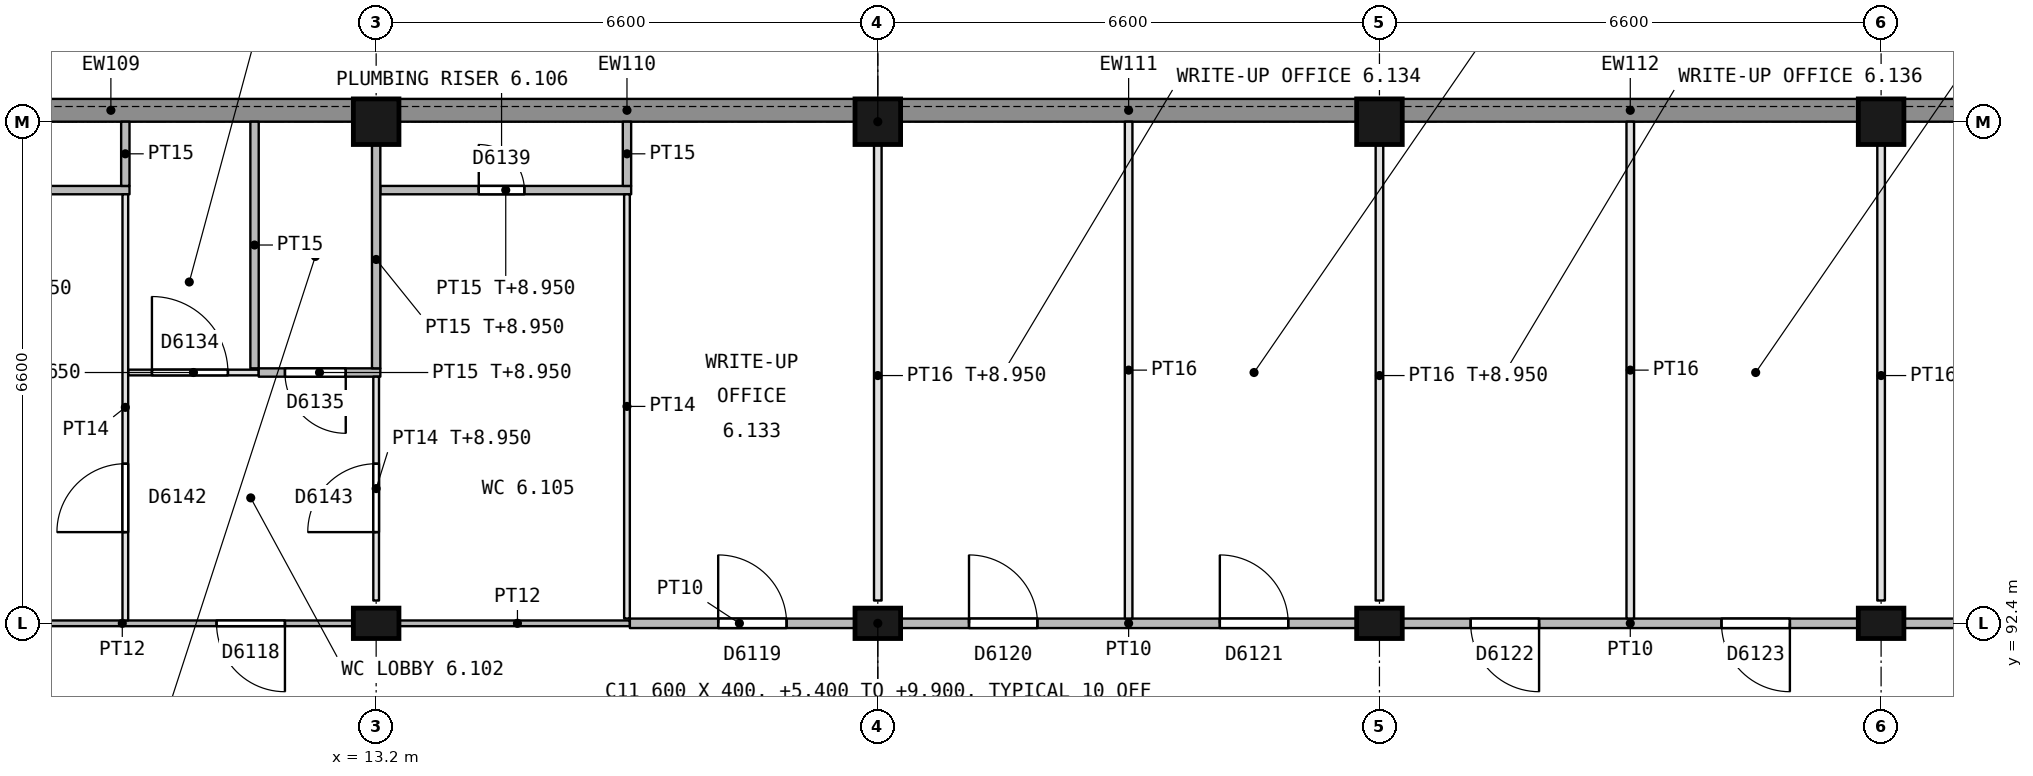
"""IFC4 building model, lengths in metres.
Left out: names, types, materials, properties, quantities, classifications, styles, units other than length and angle.
Written with IfcOpenShell. Run it as: python <this file> out.ifc"""

import sys

from ifc_helpers import new_model, si_unit, direction, frame, frame_2d, origin, origin_2d, place, context, subcontext, project, spatial, rectangle, extrude, element, fill, save


model = new_model("IFC4")
c1 = context("Model", 3, precision=1e-05, world=origin(), true_north=direction((0.0, 1.0)))
c2 = subcontext(c1, "Body", "Model", "MODEL_VIEW")
j1 = project(units=[si_unit("LENGTHUNIT", "METRE"), si_unit("PLANEANGLEUNIT", "RADIAN")], contexts=[c1])
p1 = place(None, origin())
s1 = spatial("IfcSite", under=j1, at=p1, CompositionType="ELEMENT")
p2 = place(p1, origin())
s2 = spatial("IfcBuilding", under=s1, at=p2, CompositionType="ELEMENT")
p3 = place(p2, frame((0.0, 0.0, 5.4)))
s3 = spatial("IfcBuildingStorey", under=s2, at=p3, CompositionType="ELEMENT", Elevation=5.4)
p4 = place(p3, frame((13.2, 92.4, 0.0), z_axis=(0.0, 0.0, 1.0), x_axis=(1.0, 0.0, 0.0)))
e1 = element("IfcColumn", 1, at=p4, inside=s3, PredefinedType="COLUMN", context=c2, shape_type="SweptSolid", body=[
    extrude(rectangle(XDim=0.6, YDim=0.4, at=origin_2d()), origin(), (0.0, 0.0, 1.0), 4.5),
])
p5 = place(p3, frame((13.2, 99.0, 0.0), z_axis=(0.0, 0.0, 1.0), x_axis=(1.0, 0.0, 0.0)))
e2 = element("IfcColumn", 2, at=p5, inside=s3, PredefinedType="COLUMN", context=c2, shape_type="SweptSolid", body=[
    extrude(rectangle(XDim=0.6, YDim=0.6, at=origin_2d()), origin(), (0.0, 0.0, 1.0), 4.5),
])
p6 = place(p3, frame((19.8, 92.4, 0.0), z_axis=(0.0, 0.0, 1.0), x_axis=(1.0, 0.0, 0.0)))
e3 = element("IfcColumn", 3, at=p6, inside=s3, PredefinedType="COLUMN", context=c2, shape_type="SweptSolid", body=[
    extrude(rectangle(XDim=0.6, YDim=0.4, at=origin_2d()), origin(), (0.0, 0.0, 1.0), 4.5),
])
p7 = place(p3, frame((19.8, 99.0, 0.0), z_axis=(0.0, 0.0, 1.0), x_axis=(1.0, 0.0, 0.0)))
e4 = element("IfcColumn", 4, at=p7, inside=s3, PredefinedType="COLUMN", context=c2, shape_type="SweptSolid", body=[
    extrude(rectangle(XDim=0.6, YDim=0.6, at=origin_2d()), origin(), (0.0, 0.0, 1.0), 4.5),
])
p8 = place(p3, frame((26.4, 92.4, 0.0), z_axis=(0.0, 0.0, 1.0), x_axis=(1.0, 0.0, 0.0)))
e5 = element("IfcColumn", 5, at=p8, inside=s3, PredefinedType="COLUMN", context=c2, shape_type="SweptSolid", body=[
    extrude(rectangle(XDim=0.6, YDim=0.4, at=origin_2d()), origin(), (0.0, 0.0, 1.0), 4.5),
])
p9 = place(p3, frame((26.4, 99.0, 0.0), z_axis=(0.0, 0.0, 1.0), x_axis=(1.0, 0.0, 0.0)))
e6 = element("IfcColumn", 6, at=p9, inside=s3, PredefinedType="COLUMN", context=c2, shape_type="SweptSolid", body=[
    extrude(rectangle(XDim=0.6, YDim=0.6, at=origin_2d()), origin(), (0.0, 0.0, 1.0), 4.5),
])
p10 = place(p3, frame((33.0, 92.4, 0.0), z_axis=(0.0, 0.0, 1.0), x_axis=(1.0, 0.0, 0.0)))
e7 = element("IfcColumn", 7, at=p10, inside=s3, PredefinedType="COLUMN", context=c2, shape_type="SweptSolid", body=[
    extrude(rectangle(XDim=0.6, YDim=0.4, at=origin_2d()), origin(), (0.0, 0.0, 1.0), 4.5),
])
p11 = place(p3, frame((33.0, 99.0, 0.0), z_axis=(0.0, 0.0, 1.0), x_axis=(1.0, 0.0, 0.0)))
e8 = element("IfcColumn", 8, at=p11, inside=s3, PredefinedType="COLUMN", context=c2, shape_type="SweptSolid", body=[
    extrude(rectangle(XDim=0.6, YDim=0.6, at=origin_2d()), origin(), (0.0, 0.0, 1.0), 4.5),
])
p12 = place(p3, frame((6.6, 99.15, 0.0), z_axis=(0.0, 0.0, 1.0), x_axis=(1.0, 0.0, 0.0)))
e9 = element("IfcWall", 9, at=p12, inside=s3, PredefinedType="STANDARD", context=c2, shape_type="SweptSolid", body=[
    extrude(rectangle(XDim=6.3, YDim=0.3, at=frame_2d((3.15, 0.0))), origin(), (0.0, 0.0, 1.0), 3.65),
])
for number, where, z_axis, x_axis in (
    (10, (13.5, 99.15, 0.0), (0.0, 0.0, 1.0), (1.0, 0.0, 0.0)),
    (11, (20.1, 99.15, 0.0), (0.0, 0.0, 1.0), (1.0, 0.0, 0.0)),
    (12, (26.7, 99.15, 0.0), (0.0, 0.0, 1.0), (1.0, 0.0, 0.0)),
    (13, (33.3, 99.15, 0.0), (0.0, 0.0, 1.0), (1.0, 0.0, 0.0)),
):
    element("IfcWall", number, at=place(p3, frame(where, z_axis=z_axis, x_axis=x_axis)), inside=s3, PredefinedType="STANDARD", context=c2, shape_type="SweptSolid", body=[
        extrude(rectangle(XDim=6.0, YDim=0.3, at=frame_2d((3.0, 0.0))), origin(), (0.0, 0.0, 1.0), 3.65),
    ])
p13 = place(p3, frame((6.9, 92.4, 0.0), z_axis=(0.0, 0.0, 1.0), x_axis=(1.0, 0.0, 0.0)))
e14 = element("IfcWall", 14, at=p13, inside=s3, PredefinedType="PARTITIONING", context=c2, shape_type="SweptSolid", body=[
    extrude(rectangle(XDim=6.0, YDim=0.075, at=frame_2d((3.0, 0.0))), origin(), (0.0, 0.0, 1.0), 3.65),
])
p14 = place(p13, frame((4.2, 0.0, 0.0)))
e15 = element("IfcOpeningElement", 15, at=p14, cuts=e14, PredefinedType="OPENING", context=c2, shape_type="SweptSolid", body=[
    extrude(rectangle(XDim=0.9, YDim=2.1, at=frame_2d((0.45, 1.05))), frame((0.0, 0.047, 0.0), z_axis=(0.0, -1.0, 0.0), x_axis=(1.0, 0.0, 0.0)), (0.0, 0.0, 1.0), 0.095),
])
p15 = place(p3, frame((13.5, 92.4, 0.0), z_axis=(0.0, 0.0, 1.0), x_axis=(1.0, 0.0, 0.0)))
e16 = element("IfcWall", 16, at=p15, inside=s3, PredefinedType="PARTITIONING", context=c2, shape_type="SweptSolid", body=[
    extrude(rectangle(XDim=3.038, YDim=0.075, at=frame_2d((1.519, 0.0))), origin(), (0.0, 0.0, 1.0), 3.65),
])
p16 = place(p3, frame((16.538, 92.4, 0.0), z_axis=(0.0, 0.0, 1.0), x_axis=(1.0, 0.0, 0.0)))
e17 = element("IfcWall", 17, at=p16, inside=s3, PredefinedType="PARTITIONING", context=c2, shape_type="SweptSolid", body=[
    extrude(rectangle(XDim=2.962, YDim=0.125, at=frame_2d((1.481, 0.0))), origin(), (0.0, 0.0, 1.0), 3.65),
])
p17 = place(p16, frame((1.162, 0.0, 0.0)))
e18 = element("IfcOpeningElement", 18, at=p17, cuts=e17, PredefinedType="OPENING", context=c2, shape_type="SweptSolid", body=[
    extrude(rectangle(XDim=0.9, YDim=2.1, at=frame_2d((0.45, 1.05))), frame((0.0, 0.073, 0.0), z_axis=(0.0, -1.0, 0.0), x_axis=(1.0, 0.0, 0.0)), (0.0, 0.0, 1.0), 0.145),
])
p18 = place(p3, frame((20.1, 92.4, 0.0), z_axis=(0.0, 0.0, 1.0), x_axis=(1.0, 0.0, 0.0)))
e19 = element("IfcWall", 19, at=p18, inside=s3, PredefinedType="PARTITIONING", context=c2, shape_type="SweptSolid", body=[
    extrude(rectangle(XDim=6.0, YDim=0.125, at=frame_2d((3.0, 0.0))), origin(), (0.0, 0.0, 1.0), 3.65),
])
p19 = place(p18, frame((0.9, 0.0, 0.0)))
e20 = element("IfcOpeningElement", 20, at=p19, cuts=e19, PredefinedType="OPENING", context=c2, shape_type="SweptSolid", body=[
    extrude(rectangle(XDim=0.9, YDim=2.1, at=frame_2d((0.45, 1.05))), frame((0.0, 0.073, 0.0), z_axis=(0.0, -1.0, 0.0), x_axis=(1.0, 0.0, 0.0)), (0.0, 0.0, 1.0), 0.145),
])
p20 = place(p18, frame((4.2, 0.0, 0.0)))
e21 = element("IfcOpeningElement", 21, at=p20, cuts=e19, PredefinedType="OPENING", context=c2, shape_type="SweptSolid", body=[
    extrude(rectangle(XDim=0.9, YDim=2.1, at=frame_2d((0.45, 1.05))), frame((0.0, 0.073, 0.0), z_axis=(0.0, -1.0, 0.0), x_axis=(1.0, 0.0, 0.0)), (0.0, 0.0, 1.0), 0.145),
])
p21 = place(p3, frame((26.7, 92.4, 0.0), z_axis=(0.0, 0.0, 1.0), x_axis=(1.0, 0.0, 0.0)))
e22 = element("IfcWall", 22, at=p21, inside=s3, PredefinedType="PARTITIONING", context=c2, shape_type="SweptSolid", body=[
    extrude(rectangle(XDim=6.0, YDim=0.125, at=frame_2d((3.0, 0.0))), origin(), (0.0, 0.0, 1.0), 3.65),
])
p22 = place(p21, frame((0.9, 0.0, 0.0)))
e23 = element("IfcOpeningElement", 23, at=p22, cuts=e22, PredefinedType="OPENING", context=c2, shape_type="SweptSolid", body=[
    extrude(rectangle(XDim=0.9, YDim=2.1, at=frame_2d((0.45, 1.05))), frame((0.0, 0.073, 0.0), z_axis=(0.0, -1.0, 0.0), x_axis=(1.0, 0.0, 0.0)), (0.0, 0.0, 1.0), 0.145),
])
p23 = place(p21, frame((4.2, 0.0, 0.0)))
e24 = element("IfcOpeningElement", 24, at=p23, cuts=e22, PredefinedType="OPENING", context=c2, shape_type="SweptSolid", body=[
    extrude(rectangle(XDim=0.9, YDim=2.1, at=frame_2d((0.45, 1.05))), frame((0.0, 0.073, 0.0), z_axis=(0.0, -1.0, 0.0), x_axis=(1.0, 0.0, 0.0)), (0.0, 0.0, 1.0), 0.145),
])
p24 = place(p3, frame((33.3, 92.4, 0.0), z_axis=(0.0, 0.0, 1.0), x_axis=(1.0, 0.0, 0.0)))
e25 = element("IfcWall", 25, at=p24, inside=s3, PredefinedType="PARTITIONING", context=c2, shape_type="SweptSolid", body=[
    extrude(rectangle(XDim=6.0, YDim=0.125, at=frame_2d((3.0, 0.0))), origin(), (0.0, 0.0, 1.0), 3.65),
])
p25 = place(p24, frame((0.9, 0.0, 0.0)))
e26 = element("IfcOpeningElement", 26, at=p25, cuts=e25, PredefinedType="OPENING", context=c2, shape_type="SweptSolid", body=[
    extrude(rectangle(XDim=0.9, YDim=2.1, at=frame_2d((0.45, 1.05))), frame((0.0, 0.073, 0.0), z_axis=(0.0, -1.0, 0.0), x_axis=(1.0, 0.0, 0.0)), (0.0, 0.0, 1.0), 0.145),
])
p26 = place(p24, frame((4.2, 0.0, 0.0)))
e27 = element("IfcOpeningElement", 27, at=p26, cuts=e25, PredefinedType="OPENING", context=c2, shape_type="SweptSolid", body=[
    extrude(rectangle(XDim=0.9, YDim=2.1, at=frame_2d((0.45, 1.05))), frame((0.0, 0.073, 0.0), z_axis=(0.0, -1.0, 0.0), x_axis=(1.0, 0.0, 0.0)), (0.0, 0.0, 1.0), 0.145),
])
p27 = place(p3, frame((11.655, 95.7, 0.0), z_axis=(0.0, 0.0, 1.0), x_axis=(-1.0, 0.0, 0.0)))
e28 = element("IfcWall", 28, at=p27, inside=s3, PredefinedType="PARTITIONING", context=c2, shape_type="SweptSolid", body=[
    extrude(rectangle(XDim=1.717, YDim=0.075, at=frame_2d((0.858, 0.0))), origin(), (0.0, 0.0, 1.0), 4.25),
])
p28 = place(p27, frame((0.405, 0.0, 0.0)))
e29 = element("IfcOpeningElement", 29, at=p28, cuts=e28, PredefinedType="OPENING", context=c2, shape_type="SweptSolid", body=[
    extrude(rectangle(XDim=1.0, YDim=2.1, at=frame_2d((0.5, 1.05))), frame((0.0, 0.047, 0.0), z_axis=(0.0, -1.0, 0.0), x_axis=(1.0, 0.0, 0.0)), (0.0, 0.0, 1.0), 0.095),
])
p29 = place(p3, frame((11.655, 95.7, 0.0), z_axis=(0.0, 0.0, 1.0), x_axis=(1.0, 0.0, 0.0)))
e30 = element("IfcWall", 30, at=p29, inside=s3, PredefinedType="PARTITIONING", context=c2, shape_type="SweptSolid", body=[
    extrude(rectangle(XDim=1.6, YDim=0.11, at=frame_2d((0.8, 0.0))), origin(), (0.0, 0.0, 1.0), 3.55),
])
p30 = place(p29, frame((0.345, 0.0, 0.0)))
e31 = element("IfcOpeningElement", 31, at=p30, cuts=e30, PredefinedType="OPENING", context=c2, shape_type="SweptSolid", body=[
    extrude(rectangle(XDim=0.8, YDim=2.1, at=frame_2d((0.4, 1.05))), frame((0.0, 0.065, 0.0), z_axis=(0.0, -1.0, 0.0), x_axis=(1.0, 0.0, 0.0)), (0.0, 0.0, 1.0), 0.13),
])
p31 = place(p3, frame((9.955, 98.1, 0.0), z_axis=(0.0, 0.0, 1.0), x_axis=(-1.0, 0.0, 0.0)))
e32 = element("IfcWall", 32, at=p31, inside=s3, PredefinedType="PARTITIONING", context=c2, shape_type="SweptSolid", body=[
    extrude(rectangle(XDim=3.355, YDim=0.11, at=frame_2d((1.677, 0.0))), origin(), (0.0, 0.0, 1.0), 4.25),
])
p32 = place(p31, frame((1.405, 0.0, 0.0)))
e33 = element("IfcOpeningElement", 33, at=p32, cuts=e32, PredefinedType="OPENING", context=c2, shape_type="SweptSolid", body=[
    extrude(rectangle(XDim=0.6, YDim=2.1, at=frame_2d((0.3, 1.05))), frame((0.0, 0.065, 0.0), z_axis=(0.0, -1.0, 0.0), x_axis=(1.0, 0.0, 0.0)), (0.0, 0.0, 1.0), 0.13),
])
p33 = place(p3, frame((16.555, 98.1, 0.0), z_axis=(0.0, 0.0, 1.0), x_axis=(-1.0, 0.0, 0.0)))
e34 = element("IfcWall", 34, at=p33, inside=s3, PredefinedType="PARTITIONING", context=c2, shape_type="SweptSolid", body=[
    extrude(rectangle(XDim=3.3, YDim=0.11, at=frame_2d((1.65, 0.0))), origin(), (0.0, 0.0, 1.0), 3.55),
])
p34 = place(p33, frame((1.405, 0.0, 0.0)))
e35 = element("IfcOpeningElement", 35, at=p34, cuts=e34, PredefinedType="OPENING", context=c2, shape_type="SweptSolid", body=[
    extrude(rectangle(XDim=0.6, YDim=2.1, at=frame_2d((0.3, 1.05))), frame((0.0, 0.065, 0.0), z_axis=(0.0, -1.0, 0.0), x_axis=(1.0, 0.0, 0.0)), (0.0, 0.0, 1.0), 0.13),
])
p35 = place(p3, frame((9.9, 92.438, 0.0), z_axis=(0.0, 0.0, 1.0), x_axis=(0.0, 1.0, 0.0)))
e36 = element("IfcWall", 36, at=p35, inside=s3, PredefinedType="PARTITIONING", context=c2, shape_type="SweptSolid", body=[
    extrude(rectangle(XDim=5.607, YDim=0.075, at=frame_2d((2.803, 0.0))), origin(), (0.0, 0.0, 1.0), 3.65),
])
p36 = place(p35, frame((1.162, 0.0, 0.0)))
e37 = element("IfcOpeningElement", 37, at=p36, cuts=e36, PredefinedType="OPENING", context=c2, shape_type="SweptSolid", body=[
    extrude(rectangle(XDim=0.9, YDim=2.1, at=frame_2d((0.45, 1.05))), frame((0.0, 0.047, 0.0), z_axis=(0.0, -1.0, 0.0), x_axis=(1.0, 0.0, 0.0)), (0.0, 0.0, 1.0), 0.095),
])
p37 = place(p3, frame((9.9, 98.155, 0.0), z_axis=(0.0, 0.0, 1.0), x_axis=(0.0, 1.0, 0.0)))
e38 = element("IfcWall", 38, at=p37, inside=s3, PredefinedType="PARTITIONING", context=c2, shape_type="SweptSolid", body=[
    extrude(rectangle(XDim=0.845, YDim=0.11, at=frame_2d((0.422, 0.0))), origin(), (0.0, 0.0, 1.0), 3.65),
])
p38 = place(p3, frame((11.6, 95.755, 0.0), z_axis=(0.0, 0.0, 1.0), x_axis=(0.0, 1.0, 0.0)))
e39 = element("IfcWall", 39, at=p38, inside=s3, PredefinedType="PARTITIONING", context=c2, shape_type="SweptSolid", body=[
    extrude(rectangle(XDim=3.245, YDim=0.11, at=frame_2d((1.623, 0.0))), origin(), (0.0, 0.0, 1.0), 3.65),
])
p39 = place(p3, frame((13.2, 95.645, 0.0), z_axis=(0.0, 0.0, 1.0), x_axis=(0.0, -1.0, 0.0)))
e40 = element("IfcWall", 40, at=p39, inside=s3, PredefinedType="PARTITIONING", context=c2, shape_type="SweptSolid", body=[
    extrude(rectangle(XDim=2.945, YDim=0.075, at=frame_2d((1.473, 0.0))), origin(), (0.0, 0.0, 1.0), 3.55),
])
p40 = place(p39, frame((1.145, 0.0, 0.0)))
e41 = element("IfcOpeningElement", 41, at=p40, cuts=e40, PredefinedType="OPENING", context=c2, shape_type="SweptSolid", body=[
    extrude(rectangle(XDim=0.9, YDim=2.1, at=frame_2d((0.45, 1.05))), frame((0.0, 0.047, 0.0), z_axis=(0.0, -1.0, 0.0), x_axis=(1.0, 0.0, 0.0)), (0.0, 0.0, 1.0), 0.095),
])
p41 = place(p3, frame((13.2, 95.755, 0.0), z_axis=(0.0, 0.0, 1.0), x_axis=(0.0, 1.0, 0.0)))
e42 = element("IfcWall", 42, at=p41, inside=s3, PredefinedType="PARTITIONING", context=c2, shape_type="SweptSolid", body=[
    extrude(rectangle(XDim=2.945, YDim=0.11, at=frame_2d((1.473, 0.0))), origin(), (0.0, 0.0, 1.0), 3.55),
])
p42 = place(p3, frame((16.5, 92.463, 0.0), z_axis=(0.0, 0.0, 1.0), x_axis=(0.0, 1.0, 0.0)))
e43 = element("IfcWall", 43, at=p42, inside=s3, PredefinedType="PARTITIONING", context=c2, shape_type="SweptSolid", body=[
    extrude(rectangle(XDim=5.582, YDim=0.075, at=frame_2d((2.791, 0.0))), origin(), (0.0, 0.0, 1.0), 3.65),
])
p43 = place(p3, frame((16.5, 98.155, 0.0), z_axis=(0.0, 0.0, 1.0), x_axis=(0.0, 1.0, 0.0)))
e44 = element("IfcWall", 44, at=p43, inside=s3, PredefinedType="PARTITIONING", context=c2, shape_type="SweptSolid", body=[
    extrude(rectangle(XDim=0.845, YDim=0.11, at=frame_2d((0.422, 0.0))), origin(), (0.0, 0.0, 1.0), 3.65),
])
p44 = place(p3, frame((19.8, 92.7, 0.0), z_axis=(0.0, 0.0, 1.0), x_axis=(0.0, 1.0, 0.0)))
e45 = element("IfcWall", 45, at=p44, inside=s3, PredefinedType="PARTITIONING", context=c2, shape_type="SweptSolid", body=[
    extrude(rectangle(XDim=6.0, YDim=0.1, at=frame_2d((3.0, 0.0))), origin(), (0.0, 0.0, 1.0), 3.55),
])
p45 = place(p3, frame((23.1, 92.463, 0.0), z_axis=(0.0, 0.0, 1.0), x_axis=(0.0, 1.0, 0.0)))
e46 = element("IfcWall", 46, at=p45, inside=s3, PredefinedType="PARTITIONING", context=c2, shape_type="SweptSolid", body=[
    extrude(rectangle(XDim=6.537, YDim=0.1, at=frame_2d((3.269, 0.0))), origin(), (0.0, 0.0, 1.0), 3.65),
])
p46 = place(p3, frame((26.4, 92.7, 0.0), z_axis=(0.0, 0.0, 1.0), x_axis=(0.0, 1.0, 0.0)))
e47 = element("IfcWall", 47, at=p46, inside=s3, PredefinedType="PARTITIONING", context=c2, shape_type="SweptSolid", body=[
    extrude(rectangle(XDim=6.0, YDim=0.1, at=frame_2d((3.0, 0.0))), origin(), (0.0, 0.0, 1.0), 3.55),
])
p47 = place(p3, frame((29.7, 92.463, 0.0), z_axis=(0.0, 0.0, 1.0), x_axis=(0.0, 1.0, 0.0)))
e48 = element("IfcWall", 48, at=p47, inside=s3, PredefinedType="PARTITIONING", context=c2, shape_type="SweptSolid", body=[
    extrude(rectangle(XDim=6.537, YDim=0.1, at=frame_2d((3.269, 0.0))), origin(), (0.0, 0.0, 1.0), 3.65),
])
p48 = place(p3, frame((33.0, 92.7, 0.0), z_axis=(0.0, 0.0, 1.0), x_axis=(0.0, 1.0, 0.0)))
e49 = element("IfcWall", 49, at=p48, inside=s3, PredefinedType="PARTITIONING", context=c2, shape_type="SweptSolid", body=[
    extrude(rectangle(XDim=6.0, YDim=0.1, at=frame_2d((3.0, 0.0))), origin(), (0.0, 0.0, 1.0), 3.55),
])
p49 = place(p14, origin())
e50 = element("IfcDoor", 50, at=p49, inside=s3, OperationType="SINGLE_SWING_RIGHT", PredefinedType="DOOR", context=c2, shape_type="SweptSolid", body=[
    extrude(rectangle(XDim=0.9, YDim=2.1, at=frame_2d((0.45, 1.05))), frame((0.0, 0.025, 0.0), z_axis=(0.0, -1.0, 0.0), x_axis=(1.0, 0.0, 0.0)), (0.0, 0.0, 1.0), 0.05),
])
fill(e15, e50)
p50 = place(p17, origin())
e51 = element("IfcDoor", 51, at=p50, inside=s3, OperationType="SINGLE_SWING_LEFT", PredefinedType="DOOR", context=c2, shape_type="SweptSolid", body=[
    extrude(rectangle(XDim=0.9, YDim=2.1, at=frame_2d((0.45, 1.05))), frame((0.0, 0.025, 0.0), z_axis=(0.0, -1.0, 0.0), x_axis=(1.0, 0.0, 0.0)), (0.0, 0.0, 1.0), 0.05),
])
fill(e18, e51)
p51 = place(p19, origin())
e52 = element("IfcDoor", 52, at=p51, inside=s3, OperationType="SINGLE_SWING_LEFT", PredefinedType="DOOR", context=c2, shape_type="SweptSolid", body=[
    extrude(rectangle(XDim=0.9, YDim=2.1, at=frame_2d((0.45, 1.05))), frame((0.0, 0.025, 0.0), z_axis=(0.0, -1.0, 0.0), x_axis=(1.0, 0.0, 0.0)), (0.0, 0.0, 1.0), 0.05),
])
fill(e20, e52)
p52 = place(p20, origin())
e53 = element("IfcDoor", 53, at=p52, inside=s3, OperationType="SINGLE_SWING_LEFT", PredefinedType="DOOR", context=c2, shape_type="SweptSolid", body=[
    extrude(rectangle(XDim=0.9, YDim=2.1, at=frame_2d((0.45, 1.05))), frame((0.0, 0.025, 0.0), z_axis=(0.0, -1.0, 0.0), x_axis=(1.0, 0.0, 0.0)), (0.0, 0.0, 1.0), 0.05),
])
fill(e21, e53)
p53 = place(p22, origin())
e54 = element("IfcDoor", 54, at=p53, inside=s3, OperationType="SINGLE_SWING_RIGHT", PredefinedType="DOOR", context=c2, shape_type="SweptSolid", body=[
    extrude(rectangle(XDim=0.9, YDim=2.1, at=frame_2d((0.45, 1.05))), frame((0.0, 0.025, 0.0), z_axis=(0.0, -1.0, 0.0), x_axis=(1.0, 0.0, 0.0)), (0.0, 0.0, 1.0), 0.05),
])
fill(e23, e54)
p54 = place(p23, origin())
e55 = element("IfcDoor", 55, at=p54, inside=s3, OperationType="SINGLE_SWING_RIGHT", PredefinedType="DOOR", context=c2, shape_type="SweptSolid", body=[
    extrude(rectangle(XDim=0.9, YDim=2.1, at=frame_2d((0.45, 1.05))), frame((0.0, 0.025, 0.0), z_axis=(0.0, -1.0, 0.0), x_axis=(1.0, 0.0, 0.0)), (0.0, 0.0, 1.0), 0.05),
])
fill(e24, e55)
p55 = place(p28, origin())
e56 = element("IfcDoor", 56, at=p55, inside=s3, OperationType="SINGLE_SWING_RIGHT", PredefinedType="DOOR", context=c2, shape_type="SweptSolid", body=[
    extrude(rectangle(XDim=1.0, YDim=2.1, at=frame_2d((0.5, 1.05))), frame((0.0, 0.025, 0.0), z_axis=(0.0, -1.0, 0.0), x_axis=(1.0, 0.0, 0.0)), (0.0, 0.0, 1.0), 0.05),
])
fill(e29, e56)
p56 = place(p30, origin())
e57 = element("IfcDoor", 57, at=p56, inside=s3, OperationType="SINGLE_SWING_RIGHT", PredefinedType="DOOR", context=c2, shape_type="SweptSolid", body=[
    extrude(rectangle(XDim=0.8, YDim=2.1, at=frame_2d((0.4, 1.05))), frame((0.0, 0.025, 0.0), z_axis=(0.0, -1.0, 0.0), x_axis=(1.0, 0.0, 0.0)), (0.0, 0.0, 1.0), 0.05),
])
fill(e31, e57)
p57 = place(p34, origin())
e58 = element("IfcDoor", 58, at=p57, inside=s3, OperationType="SINGLE_SWING_RIGHT", PredefinedType="DOOR", context=c2, shape_type="SweptSolid", body=[
    extrude(rectangle(XDim=0.6, YDim=2.1, at=frame_2d((0.3, 1.05))), frame((0.0, 0.025, 0.0), z_axis=(0.0, -1.0, 0.0), x_axis=(1.0, 0.0, 0.0)), (0.0, 0.0, 1.0), 0.05),
])
fill(e35, e58)
p58 = place(p36, origin())
e59 = element("IfcDoor", 59, at=p58, inside=s3, OperationType="SINGLE_SWING_LEFT", PredefinedType="DOOR", context=c2, shape_type="SweptSolid", body=[
    extrude(rectangle(XDim=0.9, YDim=2.1, at=frame_2d((0.45, 1.05))), frame((0.0, 0.025, 0.0), z_axis=(0.0, -1.0, 0.0), x_axis=(1.0, 0.0, 0.0)), (0.0, 0.0, 1.0), 0.05),
])
fill(e37, e59)
p59 = place(p40, origin())
e60 = element("IfcDoor", 60, at=p59, inside=s3, OperationType="SINGLE_SWING_RIGHT", PredefinedType="DOOR", context=c2, shape_type="SweptSolid", body=[
    extrude(rectangle(XDim=0.9, YDim=2.1, at=frame_2d((0.45, 1.05))), frame((0.0, 0.025, 0.0), z_axis=(0.0, -1.0, 0.0), x_axis=(1.0, 0.0, 0.0)), (0.0, 0.0, 1.0), 0.05),
])
fill(e41, e60)
save(model, sys.argv[1])
